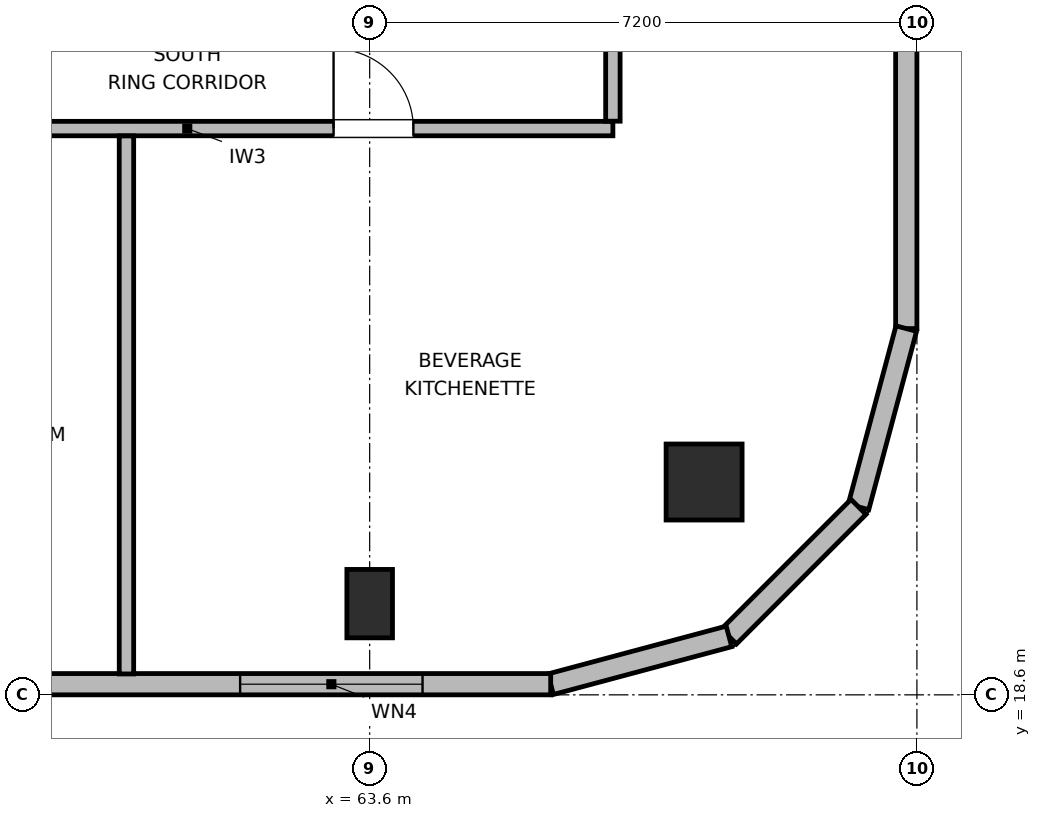
"""IFC4 building model, lengths in metres.
Left out: names, types, materials, properties, quantities, classifications, styles, units other than length and angle.
Written with IfcOpenShell. Run it as: python <this file> out.ifc"""

import sys

from ifc_helpers import new_model, si_unit, direction, frame, frame_2d, origin, origin_2d, place, context, subcontext, project, spatial, rectangle, circle, extrude, element, fill, save


model = new_model("IFC4")
c1 = context("Model", 3, precision=1e-05, world=origin(), true_north=direction((0.0, 1.0)))
c2 = subcontext(c1, "Body", "Model", "MODEL_VIEW")
j1 = project(units=[si_unit("LENGTHUNIT", "METRE"), si_unit("PLANEANGLEUNIT", "RADIAN")], contexts=[c1])
p1 = place(None, origin())
s1 = spatial("IfcSite", under=j1, at=p1, CompositionType="ELEMENT")
p2 = place(p1, origin())
s2 = spatial("IfcBuilding", under=s1, at=p2, CompositionType="ELEMENT")
p3 = place(p2, frame((0.0, 0.0, 346.5)))
s3 = spatial("IfcBuildingStorey", under=s2, at=p3, CompositionType="ELEMENT", Elevation=346.5)
p4 = place(p3, frame((68.0, 21.4, 0.0), z_axis=(0.0, 0.0, 1.0), x_axis=(1.0, 0.0, 0.0)))
e1 = element("IfcColumn", 1, at=p4, inside=s3, PredefinedType="COLUMN", context=c2, shape_type="SweptSolid", body=[
    extrude(circle(Radius=0.5, at=origin_2d()), origin(), (0.0, 0.0, 1.0), 3.9),
])
p5 = place(p3, frame((63.6, 19.8, 0.0), z_axis=(0.0, 0.0, 1.0), x_axis=(1.0, 0.0, 0.0)))
e2 = element("IfcColumn", 2, at=p5, inside=s3, PredefinedType="COLUMN", context=c2, shape_type="SweptSolid", body=[
    extrude(rectangle(XDim=0.6, YDim=0.9, at=origin_2d()), origin(), (0.0, 0.0, 1.0), 3.9),
])
p6 = place(p3, frame((70.66, 37.66, 0.0), z_axis=(0.0, 0.0, 1.0), x_axis=(0.0, -1.0, 0.0)))
e3 = element("IfcWall", 3, at=p6, inside=s3, PredefinedType="SOLIDWALL", context=c2, shape_type="SweptSolid", body=[
    extrude(rectangle(XDim=14.241, YDim=0.28, at=frame_2d((7.121, 0.0))), origin(), (0.0, 0.0, 1.0), 3.68),
])
p7 = place(p6, frame((7.556, 0.0, 0.85)))
e4 = element("IfcOpeningElement", 4, at=p7, cuts=e3, PredefinedType="OPENING", context=c2, shape_type="SweptSolid", body=[
    extrude(rectangle(XDim=1.6, YDim=1.0, at=frame_2d((0.8, 0.5))), frame((0.0, 0.15, 0.0), z_axis=(0.0, -1.0, 0.0), x_axis=(1.0, 0.0, 0.0)), (0.0, 0.0, 1.0), 0.3),
])
p8 = place(p3, frame((70.66, 23.418, 0.0), z_axis=(0.0, 0.0, 1.0), x_axis=(-0.258751159445, -0.965944013639, 0.0)))
e5 = element("IfcWall", 5, at=p8, inside=s3, PredefinedType="SOLIDWALL", context=c2, shape_type="SweptSolid", body=[
    extrude(rectangle(XDim=2.429, YDim=0.28, at=frame_2d((1.214, 0.0))), origin(), (0.0, 0.0, 1.0), 3.68),
])
p9 = place(p3, frame((70.031, 21.073, 0.0), z_axis=(0.0, 0.0, 1.0), x_axis=(-0.707106781187, -0.707106781187, 0.0)))
e6 = element("IfcWall", 6, at=p9, inside=s3, PredefinedType="SOLIDWALL", context=c2, shape_type="SweptSolid", body=[
    extrude(rectangle(XDim=2.41, YDim=0.28, at=frame_2d((1.205, 0.0))), origin(), (0.0, 0.0, 1.0), 3.68),
])
p10 = place(p3, frame((68.327, 19.368, 0.0), z_axis=(0.0, 0.0, 1.0), x_axis=(-0.965937282298, -0.25877628691, 0.0)))
e7 = element("IfcWall", 7, at=p10, inside=s3, PredefinedType="SOLIDWALL", context=c2, shape_type="SweptSolid", body=[
    extrude(rectangle(XDim=2.428, YDim=0.28, at=frame_2d((1.214, 0.0))), origin(), (0.0, 0.0, 1.0), 3.68),
])
p11 = place(p3, frame((65.982, 18.74, 0.0), z_axis=(0.0, 0.0, 1.0), x_axis=(-1.0, 0.0, 0.0)))
e8 = element("IfcWall", 8, at=p11, inside=s3, PredefinedType="SOLIDWALL", context=c2, shape_type="SweptSolid", body=[
    extrude(rectangle(XDim=11.351, YDim=0.28, at=frame_2d((5.676, 0.0))), origin(), (0.0, 0.0, 1.0), 3.68),
])
p12 = place(p11, frame((1.686, 0.0, 0.85)))
e9 = element("IfcOpeningElement", 9, at=p12, cuts=e8, PredefinedType="OPENING", context=c2, shape_type="SweptSolid", body=[
    extrude(rectangle(XDim=2.4, YDim=1.15, at=frame_2d((1.2, 0.575))), frame((0.0, 0.15, 0.0), z_axis=(0.0, -1.0, 0.0), x_axis=(1.0, 0.0, 0.0)), (0.0, 0.0, 1.0), 0.3),
])
p13 = place(p3, frame((29.4, 26.05, 0.0), z_axis=(0.0, 0.0, 1.0), x_axis=(1.0, 0.0, 0.0)))
e10 = element("IfcWall", 10, at=p13, inside=s3, PredefinedType="PLUMBINGWALL", context=c2, shape_type="SweptSolid", body=[
    extrude(rectangle(XDim=37.4, YDim=0.19, at=frame_2d((18.7, 0.0))), origin(), (0.0, 0.0, 1.0), 3.68),
])
p14 = place(p13, frame((1.025, 0.0, 0.0)))
e11 = element("IfcOpeningElement", 11, at=p14, cuts=e10, PredefinedType="OPENING", context=c2, shape_type="SweptSolid", body=[
    extrude(rectangle(XDim=1.05, YDim=2.04, at=frame_2d((0.525, 1.02))), frame((0.0, 0.105, 0.0), z_axis=(0.0, -1.0, 0.0), x_axis=(1.0, 0.0, 0.0)), (0.0, 0.0, 1.0), 0.21),
])
p15 = place(p13, frame((4.125, 0.0, 0.0)))
e12 = element("IfcOpeningElement", 12, at=p15, cuts=e10, PredefinedType="OPENING", context=c2, shape_type="SweptSolid", body=[
    extrude(rectangle(XDim=1.05, YDim=2.04, at=frame_2d((0.525, 1.02))), frame((0.0, 0.105, 0.0), z_axis=(0.0, -1.0, 0.0), x_axis=(1.0, 0.0, 0.0)), (0.0, 0.0, 1.0), 0.21),
])
p16 = place(p13, frame((7.325, 0.0, 0.0)))
e13 = element("IfcOpeningElement", 13, at=p16, cuts=e10, PredefinedType="OPENING", context=c2, shape_type="SweptSolid", body=[
    extrude(rectangle(XDim=1.05, YDim=2.04, at=frame_2d((0.525, 1.02))), frame((0.0, 0.105, 0.0), z_axis=(0.0, -1.0, 0.0), x_axis=(1.0, 0.0, 0.0)), (0.0, 0.0, 1.0), 0.21),
])
p17 = place(p13, frame((10.525, 0.0, 0.0)))
e14 = element("IfcOpeningElement", 14, at=p17, cuts=e10, PredefinedType="OPENING", context=c2, shape_type="SweptSolid", body=[
    extrude(rectangle(XDim=1.05, YDim=2.04, at=frame_2d((0.525, 1.02))), frame((0.0, 0.105, 0.0), z_axis=(0.0, -1.0, 0.0), x_axis=(1.0, 0.0, 0.0)), (0.0, 0.0, 1.0), 0.21),
])
p18 = place(p13, frame((14.525, 0.0, 0.0)))
e15 = element("IfcOpeningElement", 15, at=p18, cuts=e10, PredefinedType="OPENING", context=c2, shape_type="SweptSolid", body=[
    extrude(rectangle(XDim=1.05, YDim=2.04, at=frame_2d((0.525, 1.02))), frame((0.0, 0.105, 0.0), z_axis=(0.0, -1.0, 0.0), x_axis=(1.0, 0.0, 0.0)), (0.0, 0.0, 1.0), 0.21),
])
p19 = place(p13, frame((18.625, 0.0, 0.0)))
e16 = element("IfcOpeningElement", 16, at=p19, cuts=e10, PredefinedType="OPENING", context=c2, shape_type="SweptSolid", body=[
    extrude(rectangle(XDim=1.05, YDim=2.04, at=frame_2d((0.525, 1.02))), frame((0.0, 0.105, 0.0), z_axis=(0.0, -1.0, 0.0), x_axis=(1.0, 0.0, 0.0)), (0.0, 0.0, 1.0), 0.21),
])
p20 = place(p13, frame((22.025, 0.0, 0.0)))
e17 = element("IfcOpeningElement", 17, at=p20, cuts=e10, PredefinedType="OPENING", context=c2, shape_type="SweptSolid", body=[
    extrude(rectangle(XDim=1.05, YDim=2.04, at=frame_2d((0.525, 1.02))), frame((0.0, 0.105, 0.0), z_axis=(0.0, -1.0, 0.0), x_axis=(1.0, 0.0, 0.0)), (0.0, 0.0, 1.0), 0.21),
])
p21 = place(p13, frame((25.425, 0.0, 0.0)))
e18 = element("IfcOpeningElement", 18, at=p21, cuts=e10, PredefinedType="OPENING", context=c2, shape_type="SweptSolid", body=[
    extrude(rectangle(XDim=1.05, YDim=2.04, at=frame_2d((0.525, 1.02))), frame((0.0, 0.105, 0.0), z_axis=(0.0, -1.0, 0.0), x_axis=(1.0, 0.0, 0.0)), (0.0, 0.0, 1.0), 0.21),
])
p22 = place(p13, frame((28.825, 0.0, 0.0)))
e19 = element("IfcOpeningElement", 19, at=p22, cuts=e10, PredefinedType="OPENING", context=c2, shape_type="SweptSolid", body=[
    extrude(rectangle(XDim=1.05, YDim=2.04, at=frame_2d((0.525, 1.02))), frame((0.0, 0.105, 0.0), z_axis=(0.0, -1.0, 0.0), x_axis=(1.0, 0.0, 0.0)), (0.0, 0.0, 1.0), 0.21),
])
p23 = place(p13, frame((33.725, 0.0, 0.0)))
e20 = element("IfcOpeningElement", 20, at=p23, cuts=e10, PredefinedType="OPENING", context=c2, shape_type="SweptSolid", body=[
    extrude(rectangle(XDim=1.05, YDim=2.04, at=frame_2d((0.525, 1.02))), frame((0.0, 0.105, 0.0), z_axis=(0.0, -1.0, 0.0), x_axis=(1.0, 0.0, 0.0)), (0.0, 0.0, 1.0), 0.21),
])
p24 = place(p3, frame((66.8, 26.147, 0.0), z_axis=(0.0, 0.0, 1.0), x_axis=(0.0, 1.0, 0.0)))
e21 = element("IfcWall", 21, at=p24, inside=s3, PredefinedType="PLUMBINGWALL", context=c2, shape_type="SweptSolid", body=[
    extrude(rectangle(XDim=19.706, YDim=0.19, at=frame_2d((9.853, 0.0))), origin(), (0.0, 0.0, 1.0), 3.68),
])
p25 = place(p24, frame((3.903, 0.0, 0.0)))
e22 = element("IfcOpeningElement", 22, at=p25, cuts=e21, PredefinedType="OPENING", context=c2, shape_type="SweptSolid", body=[
    extrude(rectangle(XDim=1.05, YDim=2.04, at=frame_2d((0.525, 1.02))), frame((0.0, 0.105, 0.0), z_axis=(0.0, -1.0, 0.0), x_axis=(1.0, 0.0, 0.0)), (0.0, 0.0, 1.0), 0.21),
])
p26 = place(p24, frame((13.853, 0.0, 0.0)))
e23 = element("IfcOpeningElement", 23, at=p26, cuts=e21, PredefinedType="OPENING", context=c2, shape_type="SweptSolid", body=[
    extrude(rectangle(XDim=1.05, YDim=2.04, at=frame_2d((0.525, 1.02))), frame((0.0, 0.105, 0.0), z_axis=(0.0, -1.0, 0.0), x_axis=(1.0, 0.0, 0.0)), (0.0, 0.0, 1.0), 0.21),
])
p27 = place(p3, frame((60.4, 18.875, 0.0), z_axis=(0.0, 0.0, 1.0), x_axis=(0.0, 1.0, 0.0)))
e24 = element("IfcWall", 24, at=p27, inside=s3, PredefinedType="PLUMBINGWALL", context=c2, shape_type="SweptSolid", body=[
    extrude(rectangle(XDim=7.078, YDim=0.19, at=frame_2d((3.539, 0.0))), origin(), (0.0, 0.0, 1.0), 3.68),
])
p28 = place(p12, origin())
e25 = element("IfcWindow", 25, at=p28, inside=s3, PartitioningType="SINGLE_PANEL", PredefinedType="WINDOW", context=c2, shape_type="SweptSolid", body=[
    extrude(rectangle(XDim=2.4, YDim=1.15, at=frame_2d((1.2, 0.575))), frame((0.0, 0.03, 0.0), z_axis=(0.0, -1.0, 0.0), x_axis=(1.0, 0.0, 0.0)), (0.0, 0.0, 1.0), 0.06),
])
fill(e9, e25)
p29 = place(p23, origin())
e26 = element("IfcDoor", 26, at=p29, inside=s3, OperationType="SINGLE_SWING_LEFT", PredefinedType="DOOR", context=c2, shape_type="SweptSolid", body=[
    extrude(rectangle(XDim=1.05, YDim=2.04, at=frame_2d((0.525, 1.02))), frame((0.0, 0.025, 0.0), z_axis=(0.0, -1.0, 0.0), x_axis=(1.0, 0.0, 0.0)), (0.0, 0.0, 1.0), 0.05),
])
fill(e20, e26)
save(model, sys.argv[1])
